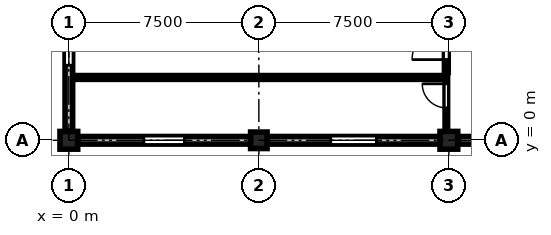
"""IFC4 building model, lengths in metres.
Left out: names, types, materials, properties, quantities, classifications, styles, units other than length and angle.
Written with IfcOpenShell. Run it as: python <this file> out.ifc"""

import sys

from ifc_helpers import new_model, si_unit, direction, frame, frame_2d, origin, origin_with_axes, origin_2d, place, context, subcontext, project, spatial, rectangle, extrude, element, fill, save


model = new_model("IFC4")
c1 = context("Model", 3, precision=1e-05, world=origin(), true_north=direction((0.0, 1.0)))
c2 = subcontext(c1, "Body", "Model", "MODEL_VIEW")
j1 = project(units=[si_unit("LENGTHUNIT", "METRE"), si_unit("PLANEANGLEUNIT", "RADIAN")], contexts=[c1])
p1 = place(None, origin())
s1 = spatial("IfcSite", under=j1, at=p1, CompositionType="ELEMENT")
p2 = place(p1, origin())
s2 = spatial("IfcBuilding", under=s1, at=p2, CompositionType="ELEMENT")
p3 = place(p2, frame((0.0, 0.0, 14.1)))
s3 = spatial("IfcBuildingStorey", under=s2, at=p3, CompositionType="ELEMENT", Elevation=14.1)
p4 = place(p3, origin_with_axes())
e1 = element("IfcColumn", 1, at=p4, inside=s3, PredefinedType="COLUMN", context=c2, shape_type="SweptSolid", body=[
    extrude(rectangle(XDim=0.7, YDim=0.7, at=origin_2d()), origin(), (0.0, 0.0, 1.0), 3.75),
])
p5 = place(p3, frame((7.5, 0.0, 0.0), z_axis=(0.0, 0.0, 1.0), x_axis=(1.0, 0.0, 0.0)))
e2 = element("IfcColumn", 2, at=p5, inside=s3, PredefinedType="COLUMN", context=c2, shape_type="SweptSolid", body=[
    extrude(rectangle(XDim=0.65, YDim=0.65, at=origin_2d()), origin(), (0.0, 0.0, 1.0), 3.75),
])
p6 = place(p3, frame((15.0, 0.0, 0.0), z_axis=(0.0, 0.0, 1.0), x_axis=(1.0, 0.0, 0.0)))
e3 = element("IfcColumn", 3, at=p6, inside=s3, PredefinedType="COLUMN", context=c2, shape_type="SweptSolid", body=[
    extrude(rectangle(XDim=0.7, YDim=0.7, at=origin_2d()), origin(), (0.0, 0.0, 1.0), 3.75),
])
p7 = place(p3, frame((7.165, 0.0, 0.0), z_axis=(0.0, 0.0, 1.0), x_axis=(-1.0, 0.0, 0.0)))
e4 = element("IfcWall", 4, at=p7, inside=s3, PredefinedType="STANDARD", context=c2, shape_type="SweptSolid", body=[
    extrude(rectangle(XDim=6.805, YDim=0.3, at=frame_2d((3.402, 0.0))), origin(), (0.0, 0.0, 1.0), 2.87),
])
p8 = place(p7, frame((2.603, 0.0, 0.9)))
e5 = element("IfcOpeningElement", 5, at=p8, cuts=e4, PredefinedType="OPENING", context=c2, shape_type="SweptSolid", body=[
    extrude(rectangle(XDim=1.6, YDim=1.69, at=frame_2d((0.8, 0.845))), frame((0.0, 0.16, 0.0), z_axis=(0.0, -1.0, 0.0), x_axis=(1.0, 0.0, 0.0)), (0.0, 0.0, 1.0), 0.32),
])
p9 = place(p3, frame((0.0, 0.36, 0.0), z_axis=(0.0, 0.0, 1.0), x_axis=(0.0, 1.0, 0.0)))
e6 = element("IfcWall", 6, at=p9, inside=s3, PredefinedType="STANDARD", context=c2, shape_type="SweptSolid", body=[
    extrude(rectangle(XDim=6.805, YDim=0.3, at=frame_2d((3.402, 0.0))), origin(), (0.0, 0.0, 1.0), 2.87),
])
p10 = place(p9, frame((2.603, 0.0, 0.9)))
e7 = element("IfcOpeningElement", 7, at=p10, cuts=e6, PredefinedType="OPENING", context=c2, shape_type="SweptSolid", body=[
    extrude(rectangle(XDim=1.6, YDim=1.69, at=frame_2d((0.8, 0.845))), frame((0.0, 0.16, 0.0), z_axis=(0.0, -1.0, 0.0), x_axis=(1.0, 0.0, 0.0)), (0.0, 0.0, 1.0), 0.32),
])
p11 = place(p3, frame((14.64, 0.0, 0.0), z_axis=(0.0, 0.0, 1.0), x_axis=(-1.0, 0.0, 0.0)))
e8 = element("IfcWall", 8, at=p11, inside=s3, PredefinedType="STANDARD", context=c2, shape_type="SweptSolid", body=[
    extrude(rectangle(XDim=6.805, YDim=0.3, at=frame_2d((3.402, 0.0))), origin(), (0.0, 0.0, 1.0), 2.87),
])
p12 = place(p11, frame((2.502, 0.0, 0.9)))
e9 = element("IfcOpeningElement", 9, at=p12, cuts=e8, PredefinedType="OPENING", context=c2, shape_type="SweptSolid", body=[
    extrude(rectangle(XDim=1.8, YDim=1.69, at=frame_2d((0.9, 0.845))), frame((0.0, 0.16, 0.0), z_axis=(0.0, -1.0, 0.0), x_axis=(1.0, 0.0, 0.0)), (0.0, 0.0, 1.0), 0.32),
])
p13 = place(p3, frame((22.165, 0.0, 0.0), z_axis=(0.0, 0.0, 1.0), x_axis=(-1.0, 0.0, 0.0)))
e10 = element("IfcWall", 10, at=p13, inside=s3, PredefinedType="STANDARD", context=c2, shape_type="SweptSolid", body=[
    extrude(rectangle(XDim=6.805, YDim=0.3, at=frame_2d((3.402, 0.0))), origin(), (0.0, 0.0, 1.0), 2.87),
])
p14 = place(p13, frame((2.403, 0.0, 0.9)))
e11 = element("IfcOpeningElement", 11, at=p14, cuts=e10, PredefinedType="OPENING", context=c2, shape_type="SweptSolid", body=[
    extrude(rectangle(XDim=2.0, YDim=1.69, at=frame_2d((1.0, 0.845))), frame((0.0, 0.16, 0.0), z_axis=(0.0, -1.0, 0.0), x_axis=(1.0, 0.0, 0.0)), (0.0, 0.0, 1.0), 0.32),
])
p15 = place(p3, frame((14.9, 0.43, 0.0), z_axis=(0.0, 0.0, 1.0), x_axis=(0.0, 1.0, 0.0)))
e12 = element("IfcWall", 12, at=p15, inside=s3, PredefinedType="PARTITIONING", context=c2, shape_type="SweptSolid", body=[
    extrude(rectangle(XDim=2.05, YDim=0.1, at=frame_2d((1.025, 0.0))), origin(), (0.0, 0.0, 1.0), 2.905),
])
p16 = place(p15, frame((0.85, 0.0, 0.0)))
e13 = element("IfcOpeningElement", 13, at=p16, cuts=e12, PredefinedType="OPENING", context=c2, shape_type="SweptSolid", body=[
    extrude(rectangle(XDim=0.95, YDim=2.15, at=frame_2d((0.475, 1.075))), frame((0.0, 0.06, 0.0), z_axis=(0.0, -1.0, 0.0), x_axis=(1.0, 0.0, 0.0)), (0.0, 0.0, 1.0), 0.12),
])
p17 = place(p3, frame((14.9, 2.68, 0.0), z_axis=(0.0, 0.0, 1.0), x_axis=(0.0, 1.0, 0.0)))
e14 = element("IfcWall", 14, at=p17, inside=s3, PredefinedType="PARTITIONING", context=c2, shape_type="SweptSolid", body=[
    extrude(rectangle(XDim=4.39, YDim=0.15, at=frame_2d((2.195, 0.0))), origin(), (0.0, 0.0, 1.0), 2.905),
])
p18 = place(p17, frame((0.504, 0.0, 0.0)))
e15 = element("IfcOpeningElement", 15, at=p18, cuts=e14, PredefinedType="OPENING", context=c2, shape_type="SweptSolid", body=[
    extrude(rectangle(XDim=1.35, YDim=2.25, at=frame_2d((0.675, 1.125))), frame((0.0, 0.085, 0.0), z_axis=(0.0, -1.0, 0.0), x_axis=(1.0, 0.0, 0.0)), (0.0, 0.0, 1.0), 0.17),
])
p19 = place(p3, frame((0.35, 2.48, 0.0), z_axis=(0.0, 0.0, 1.0), x_axis=(1.0, 0.0, 0.0)))
e16 = element("IfcWall", 16, at=p19, inside=s3, PredefinedType="PARTITIONING", context=c2, shape_type="SweptSolid", body=[
    extrude(rectangle(XDim=14.55, YDim=0.15, at=frame_2d((7.275, 0.0))), origin(), (0.0, 0.0, 1.0), 3.455),
])
p20 = place(p8, origin())
e17 = element("IfcWindow", 17, at=p20, inside=s3, PartitioningType="SINGLE_PANEL", PredefinedType="WINDOW", context=c2, shape_type="SweptSolid", body=[
    extrude(rectangle(XDim=1.6, YDim=1.69, at=frame_2d((0.8, 0.845))), frame((0.0, 0.03, 0.0), z_axis=(0.0, -1.0, 0.0), x_axis=(1.0, 0.0, 0.0)), (0.0, 0.0, 1.0), 0.06),
])
fill(e5, e17)
p21 = place(p10, origin())
e18 = element("IfcWindow", 18, at=p21, inside=s3, PartitioningType="SINGLE_PANEL", PredefinedType="WINDOW", context=c2, shape_type="SweptSolid", body=[
    extrude(rectangle(XDim=1.6, YDim=1.69, at=frame_2d((0.8, 0.845))), frame((0.0, 0.03, 0.0), z_axis=(0.0, -1.0, 0.0), x_axis=(1.0, 0.0, 0.0)), (0.0, 0.0, 1.0), 0.06),
])
fill(e7, e18)
p22 = place(p12, origin())
e19 = element("IfcWindow", 19, at=p22, inside=s3, PartitioningType="SINGLE_PANEL", PredefinedType="WINDOW", context=c2, shape_type="SweptSolid", body=[
    extrude(rectangle(XDim=1.8, YDim=1.69, at=frame_2d((0.9, 0.845))), frame((0.0, 0.03, 0.0), z_axis=(0.0, -1.0, 0.0), x_axis=(1.0, 0.0, 0.0)), (0.0, 0.0, 1.0), 0.06),
])
fill(e9, e19)
p23 = place(p16, origin())
e20 = element("IfcDoor", 20, at=p23, inside=s3, OperationType="SINGLE_SWING_RIGHT", PredefinedType="DOOR", context=c2, shape_type="SweptSolid", body=[
    extrude(rectangle(XDim=0.95, YDim=2.15, at=frame_2d((0.475, 1.075))), frame((0.0, 0.025, 0.0), z_axis=(0.0, -1.0, 0.0), x_axis=(1.0, 0.0, 0.0)), (0.0, 0.0, 1.0), 0.05),
])
fill(e13, e20)
p24 = place(p18, origin())
e21 = element("IfcDoor", 21, at=p24, inside=s3, OperationType="SINGLE_SWING_LEFT", PredefinedType="DOOR", context=c2, shape_type="SweptSolid", body=[
    extrude(rectangle(XDim=1.35, YDim=2.25, at=frame_2d((0.675, 1.125))), frame((0.0, 0.025, 0.0), z_axis=(0.0, -1.0, 0.0), x_axis=(1.0, 0.0, 0.0)), (0.0, 0.0, 1.0), 0.05),
])
fill(e15, e21)
save(model, sys.argv[1])
